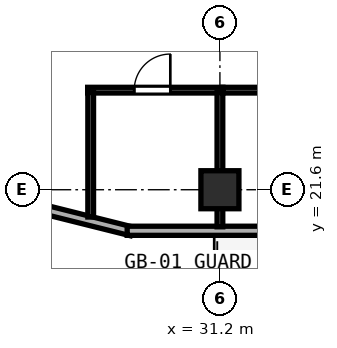
"""IFC4 building model, lengths in metres.
Left out: names, types, materials, properties, quantities, classifications, styles, units other than length and angle.
Written with IfcOpenShell. Run it as: python <this file> out.ifc"""

import sys

from ifc_helpers import new_model, si_unit, direction, frame, frame_2d, origin, origin_2d, place, context, subcontext, project, spatial, rectangle, hollow_rectangle, extrude, element, fill, save


model = new_model("IFC4")
c1 = context("Model", 3, precision=1e-05, world=origin(), true_north=direction((0.0, 1.0)))
c2 = subcontext(c1, "Body", "Model", "MODEL_VIEW")
j1 = project(units=[si_unit("LENGTHUNIT", "METRE"), si_unit("PLANEANGLEUNIT", "RADIAN")], contexts=[c1])
p1 = place(None, origin())
s1 = spatial("IfcSite", under=j1, at=p1, CompositionType="ELEMENT")
p2 = place(p1, origin())
s2 = spatial("IfcBuilding", under=s1, at=p2, CompositionType="ELEMENT")
p3 = place(p2, frame((0.0, 0.0, 121.2)))
s3 = spatial("IfcBuildingStorey", under=s2, at=p3, CompositionType="ELEMENT", Elevation=121.2)
p4 = place(p3, frame((31.2, 21.6, 0.0), z_axis=(0.0, 0.0, 1.0), x_axis=(1.0, 0.0, 0.0)))
e1 = element("IfcColumn", 1, at=p4, inside=s3, PredefinedType="COLUMN", context=c2, shape_type="SweptSolid", body=[
    extrude(hollow_rectangle(XDim=1.0, YDim=1.0, WallThickness=0.038, at=origin_2d()), origin(), (0.0, 0.0, 1.0), 3.8),
])
p5 = place(p3, frame((24.492, 21.601, 0.0), z_axis=(0.0, 0.0, 1.0), x_axis=(0.970145683738, -0.242522890311, 0.0)))
e2 = element("IfcWall", 2, at=p5, inside=s3, PredefinedType="SOLIDWALL", context=c2, shape_type="SweptSolid", body=[
    extrude(rectangle(XDim=4.511, YDim=0.24, at=frame_2d((2.255, 0.0))), origin(), (0.0, 0.0, 1.0), 3.145),
])
p6 = place(p5, frame((0.7, 0.0, 0.85)))
e3 = element("IfcOpeningElement", 3, at=p6, cuts=e2, PredefinedType="OPENING", context=c2, shape_type="SweptSolid", body=[
    extrude(rectangle(XDim=1.15, YDim=1.8, at=frame_2d((0.575, 0.9))), frame((0.0, 0.13, 0.0), z_axis=(0.0, -1.0, 0.0), x_axis=(1.0, 0.0, 0.0)), (0.0, 0.0, 1.0), 0.26),
])
p7 = place(p3, frame((28.76, 20.52, 0.0), z_axis=(0.0, 0.0, 1.0), x_axis=(1.0, 0.0, 0.0)))
e4 = element("IfcWall", 4, at=p7, inside=s3, PredefinedType="SOLIDWALL", context=c2, shape_type="SweptSolid", body=[
    extrude(rectangle(XDim=19.281, YDim=0.24, at=frame_2d((9.64, 0.0))), origin(), (0.0, 0.0, 1.0), 3.6),
])
p8 = place(p7, frame((4.84, 0.0, 0.0), z_axis=(0.0, 0.0, 1.0), x_axis=(-1.0, 0.0, 0.0)))
e5 = element("IfcOpeningElement", 5, at=p8, cuts=e4, PredefinedType="OPENING", context=c2, shape_type="SweptSolid", body=[
    extrude(rectangle(XDim=1.2, YDim=2.15, at=frame_2d((0.6, 1.075))), frame((0.0, 0.13, 0.0), z_axis=(0.0, -1.0, 0.0), x_axis=(1.0, 0.0, 0.0)), (0.0, 0.0, 1.0), 0.26),
])
p9 = place(p7, frame((15.64, 0.0, 0.0), z_axis=(0.0, 0.0, 1.0), x_axis=(-1.0, 0.0, 0.0)))
e6 = element("IfcOpeningElement", 6, at=p9, cuts=e4, PredefinedType="OPENING", context=c2, shape_type="SweptSolid", body=[
    extrude(rectangle(XDim=1.2, YDim=2.15, at=frame_2d((0.6, 1.075))), frame((0.0, 0.13, 0.0), z_axis=(0.0, -1.0, 0.0), x_axis=(1.0, 0.0, 0.0)), (0.0, 0.0, 1.0), 0.26),
])
p10 = place(p3, frame((27.72, 24.22, 0.0), z_axis=(0.0, 0.0, 1.0), x_axis=(1.0, 0.0, 0.0)))
e7 = element("IfcWall", 7, at=p10, inside=s3, PredefinedType="PARTITIONING", context=c2, shape_type="SweptSolid", body=[
    extrude(rectangle(XDim=3.56, YDim=0.15, at=frame_2d((1.78, 0.0))), origin(), (0.0, 0.0, 1.0), 3.6),
])
p11 = place(p10, frame((2.175, 0.0, 0.0), z_axis=(0.0, 0.0, 1.0), x_axis=(-1.0, 0.0, 0.0)))
e8 = element("IfcOpeningElement", 8, at=p11, cuts=e7, PredefinedType="OPENING", context=c2, shape_type="SweptSolid", body=[
    extrude(rectangle(XDim=0.95, YDim=2.12, at=frame_2d((0.475, 1.06))), frame((0.0, 0.085, 0.0), z_axis=(0.0, -1.0, 0.0), x_axis=(1.0, 0.0, 0.0)), (0.0, 0.0, 1.0), 0.17),
])
p12 = place(p3, frame((27.8, 20.882, 0.0), z_axis=(0.0, 0.0, 1.0), x_axis=(0.0, 1.0, 0.0)))
e9 = element("IfcWall", 9, at=p12, inside=s3, PredefinedType="PARTITIONING", context=c2, shape_type="SweptSolid", body=[
    extrude(rectangle(XDim=3.278, YDim=0.15, at=frame_2d((1.639, 0.0))), origin(), (0.0, 0.0, 1.0), 3.6),
])
p13 = place(p3, frame((31.2, 20.625, 0.0), z_axis=(0.0, 0.0, 1.0), x_axis=(0.0, 1.0, 0.0)))
e10 = element("IfcWall", 10, at=p13, inside=s3, PredefinedType="PARTITIONING", context=c2, shape_type="SweptSolid", body=[
    extrude(rectangle(XDim=3.535, YDim=0.15, at=frame_2d((1.768, 0.0))), origin(), (0.0, 0.0, 1.0), 3.085),
])
p14 = place(p3, frame((31.282, 24.22, 0.0), z_axis=(0.0, 0.0, 1.0), x_axis=(1.0, 0.0, 0.0)))
e11 = element("IfcWall", 11, at=p14, inside=s3, PredefinedType="PARTITIONING", context=c2, shape_type="SweptSolid", body=[
    extrude(rectangle(XDim=4.598, YDim=0.15, at=frame_2d((2.299, 0.0))), origin(), (0.0, 0.0, 1.0), 3.6),
])
p15 = place(p14, frame((2.613, 0.0, 0.0), z_axis=(0.0, 0.0, 1.0), x_axis=(-1.0, 0.0, 0.0)))
e12 = element("IfcOpeningElement", 12, at=p15, cuts=e11, PredefinedType="OPENING", context=c2, shape_type="SweptSolid", body=[
    extrude(rectangle(XDim=0.95, YDim=2.12, at=frame_2d((0.475, 1.06))), frame((0.0, 0.085, 0.0), z_axis=(0.0, -1.0, 0.0), x_axis=(1.0, 0.0, 0.0)), (0.0, 0.0, 1.0), 0.17),
])
p16 = place(p11, origin())
e13 = element("IfcDoor", 13, at=p16, inside=s3, OperationType="SINGLE_SWING_LEFT", PredefinedType="DOOR", context=c2, shape_type="SweptSolid", body=[
    extrude(rectangle(XDim=0.95, YDim=2.12, at=frame_2d((0.475, 1.06))), frame((0.0, 0.025, 0.0), z_axis=(0.0, -1.0, 0.0), x_axis=(1.0, 0.0, 0.0)), (0.0, 0.0, 1.0), 0.05),
])
fill(e8, e13)
save(model, sys.argv[1])
